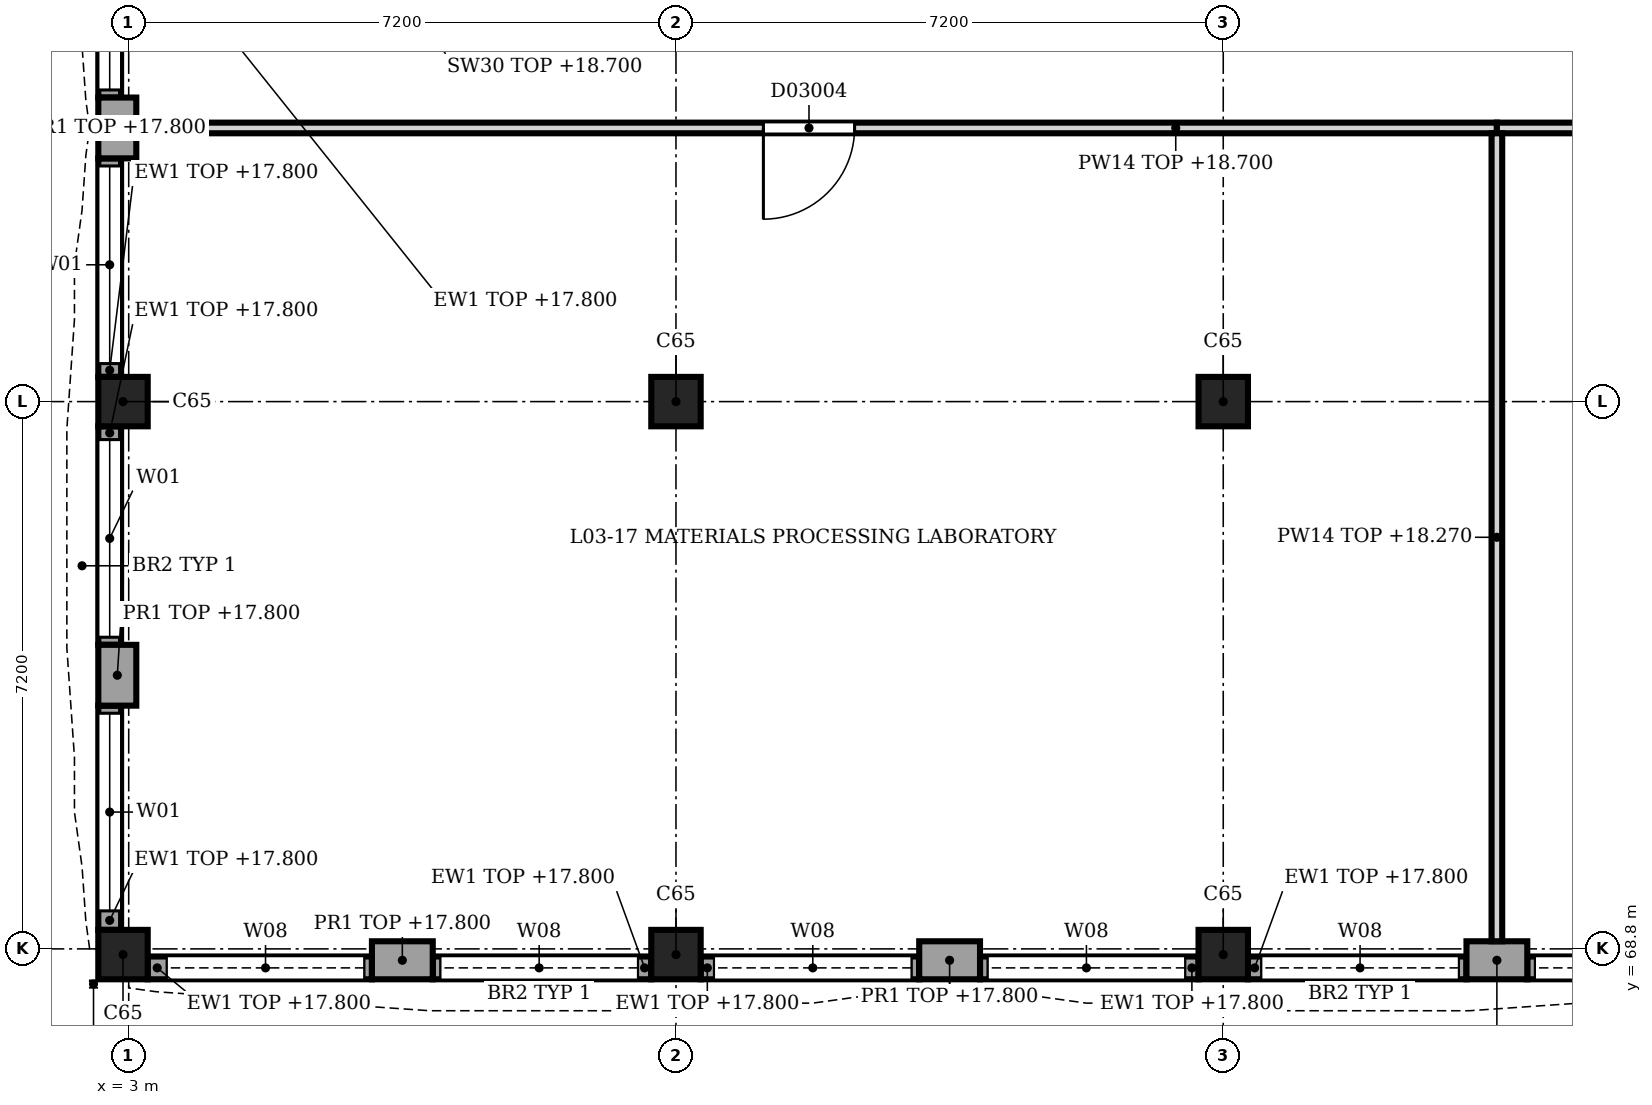
"""IFC4 building model, lengths in metres.
Left out: names, types, materials, properties, quantities, classifications, styles, units other than length and angle.
Written with IfcOpenShell. Run it as: python <this file> out.ifc"""

import sys

from ifc_helpers import new_model, si_unit, direction, frame, frame_2d, origin, origin_2d, place, context, subcontext, project, spatial, rectangle, extrude, element, fill, save


model = new_model("IFC4")
c1 = context("Model", 3, precision=1e-05, world=origin(), true_north=direction((0.0, 1.0)))
c2 = subcontext(c1, "Body", "Model", "MODEL_VIEW")
j1 = project(units=[si_unit("LENGTHUNIT", "METRE"), si_unit("PLANEANGLEUNIT", "RADIAN")], contexts=[c1])
p1 = place(None, origin())
s1 = spatial("IfcSite", under=j1, at=p1, CompositionType="ELEMENT")
p2 = place(p1, origin())
s2 = spatial("IfcBuilding", under=s1, at=p2, CompositionType="ELEMENT")
p3 = place(p2, frame((0.0, 0.0, 14.4)))
s3 = spatial("IfcBuildingStorey", under=s2, at=p3, CompositionType="ELEMENT", Elevation=14.4)
for number, where, z_axis, x_axis in (
    (1, (2.925, 68.725, 0.0), (0.0, 0.0, 1.0), (1.0, 0.0, 0.0)),
    (2, (2.925, 76.0, 0.0), (0.0, 0.0, 1.0), (1.0, 0.0, 0.0)),
    (3, (10.2, 68.725, 0.0), (0.0, 0.0, 1.0), (1.0, 0.0, 0.0)),
    (4, (10.2, 76.0, 0.0), (0.0, 0.0, 1.0), (1.0, 0.0, 0.0)),
    (5, (17.4, 68.725, 0.0), (0.0, 0.0, 1.0), (1.0, 0.0, 0.0)),
    (6, (17.4, 76.0, 0.0), (0.0, 0.0, 1.0), (1.0, 0.0, 0.0)),
):
    element("IfcColumn", number, at=place(p3, frame(where, z_axis=z_axis, x_axis=x_axis)), inside=s3, PredefinedType="COLUMN", context=c2, shape_type="SweptSolid", body=[
        extrude(rectangle(XDim=0.65, YDim=0.65, at=origin_2d()), origin(), (0.0, 0.0, 1.0), 4.5),
    ])
for number, where, z_axis, x_axis in (
    (7, (2.85, 72.0, 0.0), (0.0, 0.0, 1.0), (0.0, 1.0, 0.0)),
    (8, (2.85, 79.2, 0.0), (0.0, 0.0, 1.0), (0.0, 1.0, 0.0)),
):
    element("IfcWall", number, at=place(p3, frame(where, z_axis=z_axis, x_axis=x_axis)), inside=s3, PredefinedType="SOLIDWALL", context=c2, shape_type="SweptSolid", body=[
        extrude(rectangle(XDim=0.8, YDim=0.5, at=frame_2d((0.4, 0.0))), origin(), (0.0, 0.0, 1.0), 3.4),
    ])
p4 = place(p3, frame((2.75, 69.05, 0.0), z_axis=(0.0, 0.0, 1.0), x_axis=(0.0, 1.0, 0.0)))
e9 = element("IfcWall", 9, at=p4, inside=s3, PredefinedType="SOLIDWALL", context=c2, shape_type="SweptSolid", body=[
    extrude(rectangle(XDim=2.95, YDim=0.3, at=frame_2d((1.475, 0.0))), origin(), (0.0, 0.0, 1.0), 3.4),
])
p5 = place(p4, frame((0.25, 0.0, 0.9)))
e10 = element("IfcOpeningElement", 10, at=p5, cuts=e9, PredefinedType="OPENING", context=c2, shape_type="SweptSolid", body=[
    extrude(rectangle(XDim=2.6, YDim=2.4, at=frame_2d((1.3, 1.2))), frame((0.0, 0.16, 0.0), z_axis=(0.0, -1.0, 0.0), x_axis=(1.0, 0.0, 0.0)), (0.0, 0.0, 1.0), 0.32),
])
p6 = place(p3, frame((2.75, 72.8, 0.0), z_axis=(0.0, 0.0, 1.0), x_axis=(0.0, 1.0, 0.0)))
e11 = element("IfcWall", 11, at=p6, inside=s3, PredefinedType="SOLIDWALL", context=c2, shape_type="SweptSolid", body=[
    extrude(rectangle(XDim=2.875, YDim=0.3, at=frame_2d((1.438, 0.0))), origin(), (0.0, 0.0, 1.0), 3.4),
])
p7 = place(p6, frame((0.1, 0.0, 0.9)))
e12 = element("IfcOpeningElement", 12, at=p7, cuts=e11, PredefinedType="OPENING", context=c2, shape_type="SweptSolid", body=[
    extrude(rectangle(XDim=2.6, YDim=2.4, at=frame_2d((1.3, 1.2))), frame((0.0, 0.16, 0.0), z_axis=(0.0, -1.0, 0.0), x_axis=(1.0, 0.0, 0.0)), (0.0, 0.0, 1.0), 0.32),
])
p8 = place(p3, frame((2.75, 76.325, 0.0), z_axis=(0.0, 0.0, 1.0), x_axis=(0.0, 1.0, 0.0)))
e13 = element("IfcWall", 13, at=p8, inside=s3, PredefinedType="SOLIDWALL", context=c2, shape_type="SweptSolid", body=[
    extrude(rectangle(XDim=2.875, YDim=0.3, at=frame_2d((1.438, 0.0))), origin(), (0.0, 0.0, 1.0), 3.4),
])
p9 = place(p8, frame((0.175, 0.0, 0.9)))
e14 = element("IfcOpeningElement", 14, at=p9, cuts=e13, PredefinedType="OPENING", context=c2, shape_type="SweptSolid", body=[
    extrude(rectangle(XDim=2.6, YDim=2.4, at=frame_2d((1.3, 1.2))), frame((0.0, 0.16, 0.0), z_axis=(0.0, -1.0, 0.0), x_axis=(1.0, 0.0, 0.0)), (0.0, 0.0, 1.0), 0.32),
])
p10 = place(p3, frame((2.75, 80.0, 0.0), z_axis=(0.0, 0.0, 1.0), x_axis=(0.0, 1.0, 0.0)))
e15 = element("IfcWall", 15, at=p10, inside=s3, PredefinedType="SOLIDWALL", context=c2, shape_type="SweptSolid", body=[
    extrude(rectangle(XDim=2.875, YDim=0.3, at=frame_2d((1.438, 0.0))), origin(), (0.0, 0.0, 1.0), 3.4),
])
p11 = place(p10, frame((0.1, 0.0, 0.9)))
e16 = element("IfcOpeningElement", 16, at=p11, cuts=e15, PredefinedType="OPENING", context=c2, shape_type="SweptSolid", body=[
    extrude(rectangle(XDim=2.6, YDim=2.4, at=frame_2d((1.3, 1.2))), frame((0.0, 0.16, 0.0), z_axis=(0.0, -1.0, 0.0), x_axis=(1.0, 0.0, 0.0)), (0.0, 0.0, 1.0), 0.32),
])
p12 = place(p3, frame((21.4, 68.65, 0.0), z_axis=(0.0, 0.0, 1.0), x_axis=(-1.0, 0.0, 0.0)))
e17 = element("IfcWall", 17, at=p12, inside=s3, PredefinedType="SOLIDWALL", context=c2, shape_type="SweptSolid", body=[
    extrude(rectangle(XDim=0.8, YDim=0.5, at=frame_2d((0.4, 0.0))), origin(), (0.0, 0.0, 1.0), 3.4),
])
for number, where, z_axis, x_axis in (
    (18, (14.2, 68.65, 0.0), (0.0, 0.0, 1.0), (-1.0, 0.0, 0.0)),
    (19, (7.0, 68.65, 0.0), (0.0, 0.0, 1.0), (-1.0, 0.0, 0.0)),
):
    element("IfcWall", number, at=place(p3, frame(where, z_axis=z_axis, x_axis=x_axis)), inside=s3, PredefinedType="SOLIDWALL", context=c2, shape_type="SweptSolid", body=[
        extrude(rectangle(XDim=0.8, YDim=0.5, at=frame_2d((0.4, 0.0))), origin(), (0.0, 0.0, 1.0), 3.4),
    ])
p13 = place(p3, frame((24.275, 68.55, 0.0), z_axis=(0.0, 0.0, 1.0), x_axis=(-1.0, 0.0, 0.0)))
e20 = element("IfcWall", 20, at=p13, inside=s3, PredefinedType="SOLIDWALL", context=c2, shape_type="SweptSolid", body=[
    extrude(rectangle(XDim=2.875, YDim=0.3, at=frame_2d((1.438, 0.0))), origin(), (0.0, 0.0, 1.0), 3.4),
])
p14 = place(p13, frame((0.175, 0.0, 1.2)))
e21 = element("IfcOpeningElement", 21, at=p14, cuts=e20, PredefinedType="OPENING", context=c2, shape_type="SweptSolid", body=[
    extrude(rectangle(XDim=2.6, YDim=2.1, at=frame_2d((1.3, 1.05))), frame((0.0, 0.16, 0.0), z_axis=(0.0, -1.0, 0.0), x_axis=(1.0, 0.0, 0.0)), (0.0, 0.0, 1.0), 0.32),
])
p15 = place(p3, frame((20.6, 68.55, 0.0), z_axis=(0.0, 0.0, 1.0), x_axis=(-1.0, 0.0, 0.0)))
e22 = element("IfcWall", 22, at=p15, inside=s3, PredefinedType="SOLIDWALL", context=c2, shape_type="SweptSolid", body=[
    extrude(rectangle(XDim=2.875, YDim=0.3, at=frame_2d((1.438, 0.0))), origin(), (0.0, 0.0, 1.0), 3.4),
])
p16 = place(p15, frame((0.1, 0.0, 1.2)))
e23 = element("IfcOpeningElement", 23, at=p16, cuts=e22, PredefinedType="OPENING", context=c2, shape_type="SweptSolid", body=[
    extrude(rectangle(XDim=2.6, YDim=2.1, at=frame_2d((1.3, 1.05))), frame((0.0, 0.16, 0.0), z_axis=(0.0, -1.0, 0.0), x_axis=(1.0, 0.0, 0.0)), (0.0, 0.0, 1.0), 0.32),
])
p17 = place(p3, frame((17.075, 68.55, 0.0), z_axis=(0.0, 0.0, 1.0), x_axis=(-1.0, 0.0, 0.0)))
e24 = element("IfcWall", 24, at=p17, inside=s3, PredefinedType="SOLIDWALL", context=c2, shape_type="SweptSolid", body=[
    extrude(rectangle(XDim=2.875, YDim=0.3, at=frame_2d((1.438, 0.0))), origin(), (0.0, 0.0, 1.0), 3.4),
])
p18 = place(p17, frame((0.175, 0.0, 1.2)))
e25 = element("IfcOpeningElement", 25, at=p18, cuts=e24, PredefinedType="OPENING", context=c2, shape_type="SweptSolid", body=[
    extrude(rectangle(XDim=2.6, YDim=2.1, at=frame_2d((1.3, 1.05))), frame((0.0, 0.16, 0.0), z_axis=(0.0, -1.0, 0.0), x_axis=(1.0, 0.0, 0.0)), (0.0, 0.0, 1.0), 0.32),
])
p19 = place(p3, frame((13.4, 68.55, 0.0), z_axis=(0.0, 0.0, 1.0), x_axis=(-1.0, 0.0, 0.0)))
e26 = element("IfcWall", 26, at=p19, inside=s3, PredefinedType="SOLIDWALL", context=c2, shape_type="SweptSolid", body=[
    extrude(rectangle(XDim=2.875, YDim=0.3, at=frame_2d((1.438, 0.0))), origin(), (0.0, 0.0, 1.0), 3.4),
])
p20 = place(p19, frame((0.1, 0.0, 1.2)))
e27 = element("IfcOpeningElement", 27, at=p20, cuts=e26, PredefinedType="OPENING", context=c2, shape_type="SweptSolid", body=[
    extrude(rectangle(XDim=2.6, YDim=2.1, at=frame_2d((1.3, 1.05))), frame((0.0, 0.16, 0.0), z_axis=(0.0, -1.0, 0.0), x_axis=(1.0, 0.0, 0.0)), (0.0, 0.0, 1.0), 0.32),
])
p21 = place(p3, frame((9.875, 68.55, 0.0), z_axis=(0.0, 0.0, 1.0), x_axis=(-1.0, 0.0, 0.0)))
e28 = element("IfcWall", 28, at=p21, inside=s3, PredefinedType="SOLIDWALL", context=c2, shape_type="SweptSolid", body=[
    extrude(rectangle(XDim=2.875, YDim=0.3, at=frame_2d((1.438, 0.0))), origin(), (0.0, 0.0, 1.0), 3.4),
])
p22 = place(p21, frame((0.175, 0.0, 1.2)))
e29 = element("IfcOpeningElement", 29, at=p22, cuts=e28, PredefinedType="OPENING", context=c2, shape_type="SweptSolid", body=[
    extrude(rectangle(XDim=2.6, YDim=2.1, at=frame_2d((1.3, 1.05))), frame((0.0, 0.16, 0.0), z_axis=(0.0, -1.0, 0.0), x_axis=(1.0, 0.0, 0.0)), (0.0, 0.0, 1.0), 0.32),
])
p23 = place(p3, frame((6.2, 68.55, 0.0), z_axis=(0.0, 0.0, 1.0), x_axis=(-1.0, 0.0, 0.0)))
e30 = element("IfcWall", 30, at=p23, inside=s3, PredefinedType="SOLIDWALL", context=c2, shape_type="SweptSolid", body=[
    extrude(rectangle(XDim=2.95, YDim=0.3, at=frame_2d((1.475, 0.0))), origin(), (0.0, 0.0, 1.0), 3.4),
])
p24 = place(p23, frame((0.1, 0.0, 1.2)))
e31 = element("IfcOpeningElement", 31, at=p24, cuts=e30, PredefinedType="OPENING", context=c2, shape_type="SweptSolid", body=[
    extrude(rectangle(XDim=2.6, YDim=2.1, at=frame_2d((1.3, 1.05))), frame((0.0, 0.16, 0.0), z_axis=(0.0, -1.0, 0.0), x_axis=(1.0, 0.0, 0.0)), (0.0, 0.0, 1.0), 0.32),
])
p25 = place(p3, frame((21.0, 79.6, 0.0), z_axis=(0.0, 0.0, 1.0), x_axis=(-1.0, 0.0, 0.0)))
e32 = element("IfcWall", 32, at=p25, inside=s3, PredefinedType="PARTITIONING", context=c2, shape_type="SweptSolid", body=[
    extrude(rectangle(XDim=17.9, YDim=0.14, at=frame_2d((8.95, 0.0))), origin(), (0.0, 0.0, 1.0), 4.3),
])
p26 = place(p25, frame((8.45, 0.0, 0.0)))
e33 = element("IfcOpeningElement", 33, at=p26, cuts=e32, PredefinedType="OPENING", context=c2, shape_type="SweptSolid", body=[
    extrude(rectangle(XDim=1.2, YDim=2.1, at=frame_2d((0.6, 1.05))), frame((0.0, 0.08, 0.0), z_axis=(0.0, -1.0, 0.0), x_axis=(1.0, 0.0, 0.0)), (0.0, 0.0, 1.0), 0.16),
])
p27 = place(p3, frame((35.4, 79.6, 0.0), z_axis=(0.0, 0.0, 1.0), x_axis=(-1.0, 0.0, 0.0)))
e34 = element("IfcWall", 34, at=p27, inside=s3, PredefinedType="PARTITIONING", context=c2, shape_type="SweptSolid", body=[
    extrude(rectangle(XDim=14.4, YDim=0.14, at=frame_2d((7.2, 0.0))), origin(), (0.0, 0.0, 1.0), 4.3),
])
p28 = place(p27, frame((6.65, 0.0, 0.0)))
e35 = element("IfcOpeningElement", 35, at=p28, cuts=e34, PredefinedType="OPENING", context=c2, shape_type="SweptSolid", body=[
    extrude(rectangle(XDim=1.2, YDim=2.1, at=frame_2d((0.6, 1.05))), frame((0.0, 0.08, 0.0), z_axis=(0.0, -1.0, 0.0), x_axis=(1.0, 0.0, 0.0)), (0.0, 0.0, 1.0), 0.16),
])
p29 = place(p3, frame((21.0, 68.9, 0.0), z_axis=(0.0, 0.0, 1.0), x_axis=(0.0, 1.0, 0.0)))
e36 = element("IfcWall", 36, at=p29, inside=s3, PredefinedType="PARTITIONING", context=c2, shape_type="SweptSolid", body=[
    extrude(rectangle(XDim=10.63, YDim=0.14, at=frame_2d((5.315, 0.0))), origin(), (0.0, 0.0, 1.0), 3.87),
])
p30 = place(p5, origin())
e37 = element("IfcWindow", 37, at=p30, inside=s3, PartitioningType="SINGLE_PANEL", PredefinedType="WINDOW", context=c2, shape_type="SweptSolid", body=[
    extrude(rectangle(XDim=2.6, YDim=2.4, at=frame_2d((1.3, 1.2))), frame((0.0, 0.03, 0.0), z_axis=(0.0, -1.0, 0.0), x_axis=(1.0, 0.0, 0.0)), (0.0, 0.0, 1.0), 0.06),
])
fill(e10, e37)
p31 = place(p7, origin())
e38 = element("IfcWindow", 38, at=p31, inside=s3, PartitioningType="SINGLE_PANEL", PredefinedType="WINDOW", context=c2, shape_type="SweptSolid", body=[
    extrude(rectangle(XDim=2.6, YDim=2.4, at=frame_2d((1.3, 1.2))), frame((0.0, 0.03, 0.0), z_axis=(0.0, -1.0, 0.0), x_axis=(1.0, 0.0, 0.0)), (0.0, 0.0, 1.0), 0.06),
])
fill(e12, e38)
p32 = place(p9, origin())
e39 = element("IfcWindow", 39, at=p32, inside=s3, PartitioningType="SINGLE_PANEL", PredefinedType="WINDOW", context=c2, shape_type="SweptSolid", body=[
    extrude(rectangle(XDim=2.6, YDim=2.4, at=frame_2d((1.3, 1.2))), frame((0.0, 0.03, 0.0), z_axis=(0.0, -1.0, 0.0), x_axis=(1.0, 0.0, 0.0)), (0.0, 0.0, 1.0), 0.06),
])
fill(e14, e39)
p33 = place(p11, origin())
e40 = element("IfcWindow", 40, at=p33, inside=s3, PartitioningType="SINGLE_PANEL", PredefinedType="WINDOW", context=c2, shape_type="SweptSolid", body=[
    extrude(rectangle(XDim=2.6, YDim=2.4, at=frame_2d((1.3, 1.2))), frame((0.0, 0.03, 0.0), z_axis=(0.0, -1.0, 0.0), x_axis=(1.0, 0.0, 0.0)), (0.0, 0.0, 1.0), 0.06),
])
fill(e16, e40)
p34 = place(p14, origin())
e41 = element("IfcWindow", 41, at=p34, inside=s3, PartitioningType="SINGLE_PANEL", PredefinedType="WINDOW", context=c2, shape_type="SweptSolid", body=[
    extrude(rectangle(XDim=2.6, YDim=2.1, at=frame_2d((1.3, 1.05))), frame((0.0, 0.03, 0.0), z_axis=(0.0, -1.0, 0.0), x_axis=(1.0, 0.0, 0.0)), (0.0, 0.0, 1.0), 0.06),
])
fill(e21, e41)
p35 = place(p16, origin())
e42 = element("IfcWindow", 42, at=p35, inside=s3, PartitioningType="SINGLE_PANEL", PredefinedType="WINDOW", context=c2, shape_type="SweptSolid", body=[
    extrude(rectangle(XDim=2.6, YDim=2.1, at=frame_2d((1.3, 1.05))), frame((0.0, 0.03, 0.0), z_axis=(0.0, -1.0, 0.0), x_axis=(1.0, 0.0, 0.0)), (0.0, 0.0, 1.0), 0.06),
])
fill(e23, e42)
p36 = place(p18, origin())
e43 = element("IfcWindow", 43, at=p36, inside=s3, PartitioningType="SINGLE_PANEL", PredefinedType="WINDOW", context=c2, shape_type="SweptSolid", body=[
    extrude(rectangle(XDim=2.6, YDim=2.1, at=frame_2d((1.3, 1.05))), frame((0.0, 0.03, 0.0), z_axis=(0.0, -1.0, 0.0), x_axis=(1.0, 0.0, 0.0)), (0.0, 0.0, 1.0), 0.06),
])
fill(e25, e43)
p37 = place(p20, origin())
e44 = element("IfcWindow", 44, at=p37, inside=s3, PartitioningType="SINGLE_PANEL", PredefinedType="WINDOW", context=c2, shape_type="SweptSolid", body=[
    extrude(rectangle(XDim=2.6, YDim=2.1, at=frame_2d((1.3, 1.05))), frame((0.0, 0.03, 0.0), z_axis=(0.0, -1.0, 0.0), x_axis=(1.0, 0.0, 0.0)), (0.0, 0.0, 1.0), 0.06),
])
fill(e27, e44)
p38 = place(p22, origin())
e45 = element("IfcWindow", 45, at=p38, inside=s3, PartitioningType="SINGLE_PANEL", PredefinedType="WINDOW", context=c2, shape_type="SweptSolid", body=[
    extrude(rectangle(XDim=2.6, YDim=2.1, at=frame_2d((1.3, 1.05))), frame((0.0, 0.03, 0.0), z_axis=(0.0, -1.0, 0.0), x_axis=(1.0, 0.0, 0.0)), (0.0, 0.0, 1.0), 0.06),
])
fill(e29, e45)
p39 = place(p24, origin())
e46 = element("IfcWindow", 46, at=p39, inside=s3, PartitioningType="SINGLE_PANEL", PredefinedType="WINDOW", context=c2, shape_type="SweptSolid", body=[
    extrude(rectangle(XDim=2.6, YDim=2.1, at=frame_2d((1.3, 1.05))), frame((0.0, 0.03, 0.0), z_axis=(0.0, -1.0, 0.0), x_axis=(1.0, 0.0, 0.0)), (0.0, 0.0, 1.0), 0.06),
])
fill(e31, e46)
p40 = place(p26, origin())
e47 = element("IfcDoor", 47, at=p40, inside=s3, OperationType="SINGLE_SWING_RIGHT", PredefinedType="DOOR", context=c2, shape_type="SweptSolid", body=[
    extrude(rectangle(XDim=1.2, YDim=2.1, at=frame_2d((0.6, 1.05))), frame((0.0, 0.025, 0.0), z_axis=(0.0, -1.0, 0.0), x_axis=(1.0, 0.0, 0.0)), (0.0, 0.0, 1.0), 0.05),
])
fill(e33, e47)
save(model, sys.argv[1])
